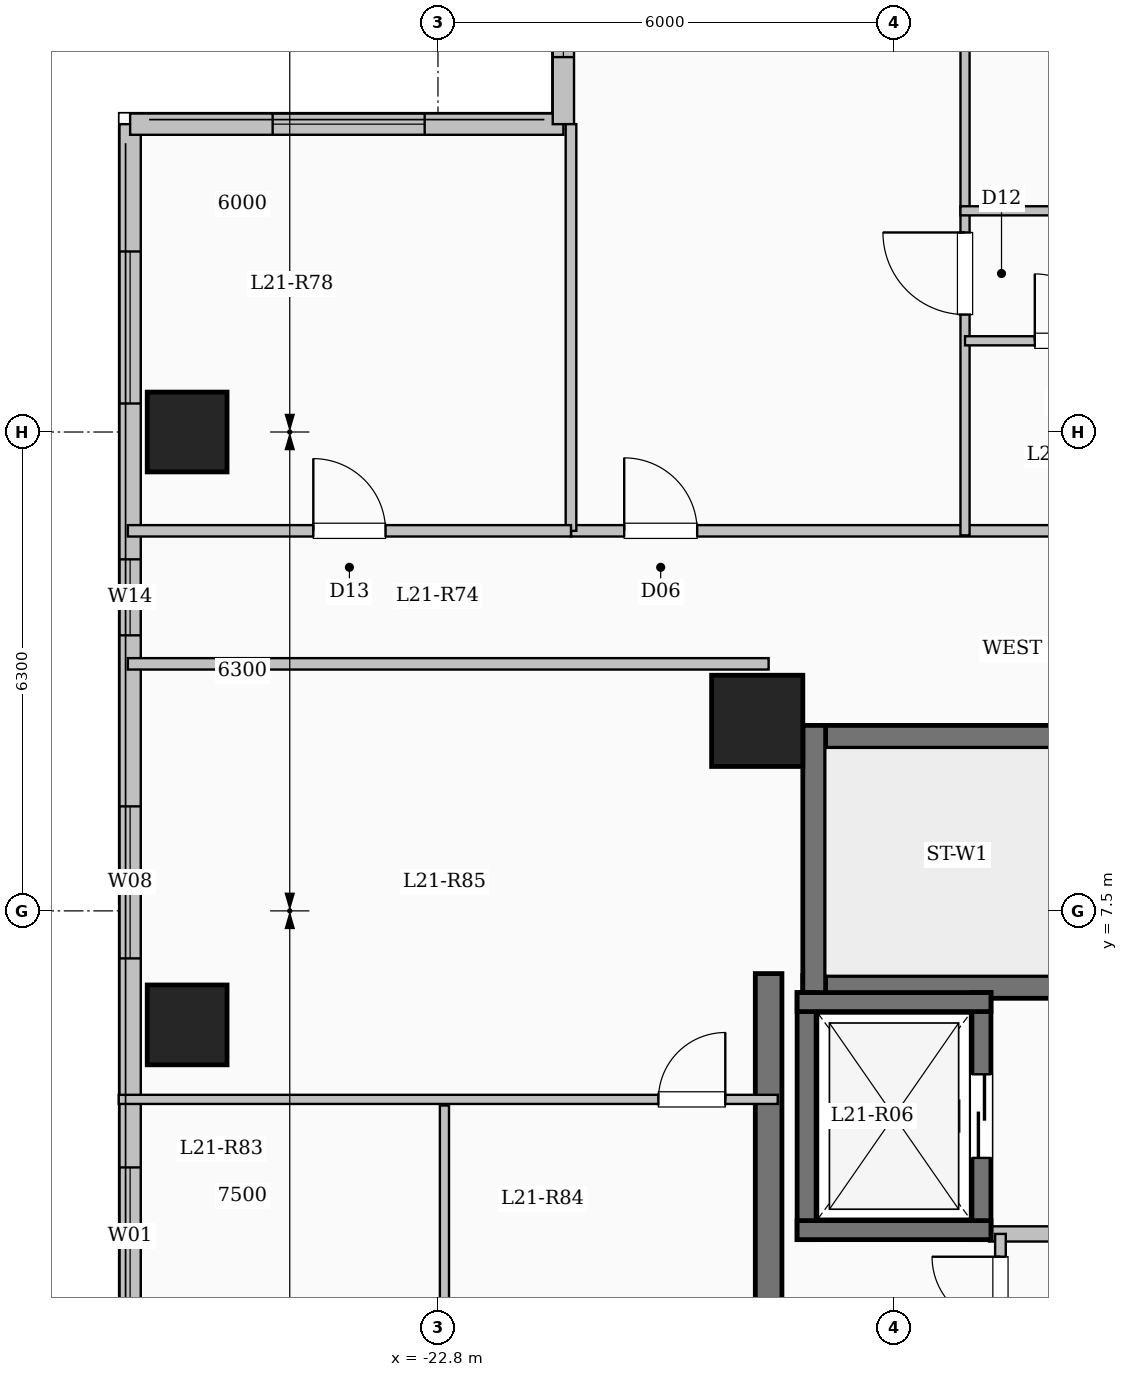
"""IFC4 building model, lengths in metres.
Left out: names, types, materials, properties, quantities, classifications, styles, units other than length and angle.
Written with IfcOpenShell. Run it as: python <this file> out.ifc"""

import sys

from ifc_helpers import new_model, si_unit, direction, frame, frame_2d, origin, origin_2d, place, context, subcontext, project, spatial, rectangle, extrude, element, fill, save


model = new_model("IFC4")
c1 = context("Model", 3, precision=1e-05, world=origin(), true_north=direction((0.0, 1.0)))
c2 = subcontext(c1, "Body", "Model", "MODEL_VIEW")
j1 = project(units=[si_unit("LENGTHUNIT", "METRE"), si_unit("PLANEANGLEUNIT", "RADIAN")], contexts=[c1])
p1 = place(None, origin())
s1 = spatial("IfcSite", under=j1, at=p1, CompositionType="ELEMENT")
p2 = place(p1, origin())
s2 = spatial("IfcBuilding", under=s1, at=p2, CompositionType="ELEMENT")
p3 = place(p2, frame((0.0, 0.0, 81.65)))
s3 = spatial("IfcBuildingStorey", under=s2, at=p3, CompositionType="ELEMENT", Elevation=81.65)
p4 = place(p3, frame((-18.6, 10.0, 0.0), z_axis=(0.0, 0.0, 1.0), x_axis=(1.0, 0.0, 0.0)))
e1 = element("IfcColumn", 1, at=p4, inside=s3, PredefinedType="COLUMN", context=c2, shape_type="SweptSolid", body=[
    extrude(rectangle(XDim=1.2, YDim=1.2, at=origin_2d()), origin(), (0.0, 0.0, 1.0), 3.35),
])
for number, where, z_axis, x_axis in (
    (2, (-26.1, 6.0, 0.0), (0.0, 0.0, 1.0), (1.0, 0.0, 0.0)),
    (3, (-26.1, 13.8, 0.0), (0.0, 0.0, 1.0), (1.0, 0.0, 0.0)),
):
    element("IfcColumn", number, at=place(p3, frame(where, z_axis=z_axis, x_axis=x_axis)), inside=s3, PredefinedType="COLUMN", context=c2, shape_type="SweptSolid", body=[
        extrude(rectangle(XDim=1.05, YDim=1.05, at=origin_2d()), origin(), (0.0, 0.0, 1.0), 3.35),
    ])
p5 = place(p3, frame((-26.85, -17.85, 0.0), z_axis=(0.0, 0.0, 1.0), x_axis=(0.0, 1.0, 0.0)))
e4 = element("IfcWall", 4, at=p5, inside=s3, PredefinedType="SOLIDWALL", context=c2, shape_type="SweptSolid", body=[
    extrude(rectangle(XDim=35.7, YDim=0.28, at=frame_2d((17.85, 0.0))), origin(), (0.0, 0.0, 1.0), 3.1),
])
p6 = place(p5, frame((2.55, 0.0, 0.9)))
e5 = element("IfcOpeningElement", 5, at=p6, cuts=e4, PredefinedType="OPENING", context=c2, shape_type="SweptSolid", body=[
    extrude(rectangle(XDim=2.4, YDim=1.8, at=frame_2d((1.2, 0.9))), frame((0.0, 0.15, 0.0), z_axis=(0.0, -1.0, 0.0), x_axis=(1.0, 0.0, 0.0)), (0.0, 0.0, 1.0), 0.3),
])
p7 = place(p5, frame((8.343, 0.0, 0.9)))
e6 = element("IfcOpeningElement", 6, at=p7, cuts=e4, PredefinedType="OPENING", context=c2, shape_type="SweptSolid", body=[
    extrude(rectangle(XDim=1.5, YDim=1.65, at=frame_2d((0.75, 0.825))), frame((0.0, 0.15, 0.0), z_axis=(0.0, -1.0, 0.0), x_axis=(1.0, 0.0, 0.0)), (0.0, 0.0, 1.0), 0.3),
])
p8 = place(p5, frame((13.75, 0.0, 0.9)))
e7 = element("IfcOpeningElement", 7, at=p8, cuts=e4, PredefinedType="OPENING", context=c2, shape_type="SweptSolid", body=[
    extrude(rectangle(XDim=2.4, YDim=1.8, at=frame_2d((1.2, 0.9))), frame((0.0, 0.15, 0.0), z_axis=(0.0, -1.0, 0.0), x_axis=(1.0, 0.0, 0.0)), (0.0, 0.0, 1.0), 0.3),
])
p9 = place(p5, frame((20.175, 0.0, 0.9)))
e8 = element("IfcOpeningElement", 8, at=p9, cuts=e4, PredefinedType="OPENING", context=c2, shape_type="SweptSolid", body=[
    extrude(rectangle(XDim=1.8, YDim=1.65, at=frame_2d((0.9, 0.825))), frame((0.0, 0.15, 0.0), z_axis=(0.0, -1.0, 0.0), x_axis=(1.0, 0.0, 0.0)), (0.0, 0.0, 1.0), 0.3),
])
p10 = place(p5, frame((24.725, 0.0, 0.9)))
e9 = element("IfcOpeningElement", 9, at=p10, cuts=e4, PredefinedType="OPENING", context=c2, shape_type="SweptSolid", body=[
    extrude(rectangle(XDim=2.0, YDim=1.7, at=frame_2d((1.0, 0.85))), frame((0.0, 0.15, 0.0), z_axis=(0.0, -1.0, 0.0), x_axis=(1.0, 0.0, 0.0)), (0.0, 0.0, 1.0), 0.3),
])
p11 = place(p5, frame((28.975, 0.0, 0.95)))
e10 = element("IfcOpeningElement", 10, at=p11, cuts=e4, PredefinedType="OPENING", context=c2, shape_type="SweptSolid", body=[
    extrude(rectangle(XDim=1.0, YDim=1.5, at=frame_2d((0.5, 0.75))), frame((0.0, 0.15, 0.0), z_axis=(0.0, -1.0, 0.0), x_axis=(1.0, 0.0, 0.0)), (0.0, 0.0, 1.0), 0.3),
])
p12 = place(p5, frame((32.025, 0.0, 0.9)))
e11 = element("IfcOpeningElement", 11, at=p12, cuts=e4, PredefinedType="OPENING", context=c2, shape_type="SweptSolid", body=[
    extrude(rectangle(XDim=2.0, YDim=1.7, at=frame_2d((1.0, 0.85))), frame((0.0, 0.15, 0.0), z_axis=(0.0, -1.0, 0.0), x_axis=(1.0, 0.0, 0.0)), (0.0, 0.0, 1.0), 0.3),
])
p13 = place(p3, frame((-26.85, 17.85, 0.0), z_axis=(0.0, 0.0, 1.0), x_axis=(1.0, 0.0, 0.0)))
e12 = element("IfcWall", 12, at=p13, inside=s3, PredefinedType="SOLIDWALL", context=c2, shape_type="SweptSolid", body=[
    extrude(rectangle(XDim=5.7, YDim=0.28, at=frame_2d((2.85, 0.0))), origin(), (0.0, 0.0, 1.0), 3.1),
])
p14 = place(p13, frame((1.875, 0.0, 0.9)))
e13 = element("IfcOpeningElement", 13, at=p14, cuts=e12, PredefinedType="OPENING", context=c2, shape_type="SweptSolid", body=[
    extrude(rectangle(XDim=2.0, YDim=1.7, at=frame_2d((1.0, 0.85))), frame((0.0, 0.15, 0.0), z_axis=(0.0, -1.0, 0.0), x_axis=(1.0, 0.0, 0.0)), (0.0, 0.0, 1.0), 0.3),
])
p15 = place(p3, frame((-21.15, 17.85, 0.0), z_axis=(0.0, 0.0, 1.0), x_axis=(0.0, 1.0, 0.0)))
e14 = element("IfcWall", 14, at=p15, inside=s3, PredefinedType="SOLIDWALL", context=c2, shape_type="SweptSolid", body=[
    extrude(rectangle(XDim=4.2, YDim=0.28, at=frame_2d((2.1, 0.0))), origin(), (0.0, 0.0, 1.0), 3.1),
])
p16 = place(p15, frame((0.882, 0.0, 0.9)))
e15 = element("IfcOpeningElement", 15, at=p16, cuts=e14, PredefinedType="OPENING", context=c2, shape_type="SweptSolid", body=[
    extrude(rectangle(XDim=2.4, YDim=1.8, at=frame_2d((1.2, 0.9))), frame((0.0, 0.15, 0.0), z_axis=(0.0, -1.0, 0.0), x_axis=(1.0, 0.0, 0.0)), (0.0, 0.0, 1.0), 0.3),
])
p17 = place(p3, frame((-18.0, 9.79, 0.0), z_axis=(0.0, 0.0, 1.0), x_axis=(1.0, 0.0, 0.0)))
e16 = element("IfcWall", 16, at=p17, inside=s3, PredefinedType="SHEAR", context=c2, shape_type="SweptSolid", body=[
    extrude(rectangle(XDim=8.0, YDim=0.3, at=frame_2d((4.0, 0.0))), origin(), (0.0, 0.0, 1.0), 3.35),
])
p18 = place(p3, frame((-18.0, 6.5, 0.0), z_axis=(0.0, 0.0, 1.0), x_axis=(1.0, 0.0, 0.0)))
e17 = element("IfcWall", 17, at=p18, inside=s3, PredefinedType="SHEAR", context=c2, shape_type="SweptSolid", body=[
    extrude(rectangle(XDim=8.0, YDim=0.3, at=frame_2d((4.0, 0.0))), origin(), (0.0, 0.0, 1.0), 3.35),
])
p19 = place(p18, frame((6.45, 0.0, 0.0)))
e18 = element("IfcOpeningElement", 18, at=p19, cuts=e17, PredefinedType="OPENING", context=c2, shape_type="SweptSolid", body=[
    extrude(rectangle(XDim=1.0, YDim=2.15, at=frame_2d((0.5, 1.075))), frame((0.0, 0.16, 0.0), z_axis=(0.0, -1.0, 0.0), x_axis=(1.0, 0.0, 0.0)), (0.0, 0.0, 1.0), 0.32),
])
p20 = place(p3, frame((-17.85, 6.35, 0.0), z_axis=(0.0, 0.0, 1.0), x_axis=(0.0, 1.0, 0.0)))
e19 = element("IfcWall", 19, at=p20, inside=s3, PredefinedType="SHEAR", context=c2, shape_type="SweptSolid", body=[
    extrude(rectangle(XDim=3.59, YDim=0.3, at=frame_2d((1.795, 0.0))), origin(), (0.0, 0.0, 1.0), 3.35),
])
p21 = place(p3, frame((-15.55, 3.25, 0.0), z_axis=(0.0, 0.0, 1.0), x_axis=(1.0, 0.0, 0.0)))
e20 = element("IfcWall", 20, at=p21, inside=s3, PredefinedType="SOLIDWALL", context=c2, shape_type="SweptSolid", body=[
    extrude(rectangle(XDim=5.4, YDim=0.2, at=frame_2d((2.7, 0.0))), origin(), (0.0, 0.0, 1.0), 3.1),
])
p22 = place(p3, frame((-17.95, 3.175, 0.0), z_axis=(0.0, 0.0, 1.0), x_axis=(0.0, 1.0, 0.0)))
e21 = element("IfcWall", 21, at=p22, inside=s3, PredefinedType="SHEAR", context=c2, shape_type="SweptSolid", body=[
    extrude(rectangle(XDim=3.25, YDim=0.25, at=frame_2d((1.625, 0.0))), origin(), (0.0, 0.0, 1.0), 3.35),
])
p23 = place(p3, frame((-15.65, 3.175, 0.0), z_axis=(0.0, 0.0, 1.0), x_axis=(0.0, 1.0, 0.0)))
e22 = element("IfcWall", 22, at=p23, inside=s3, PredefinedType="SHEAR", context=c2, shape_type="SweptSolid", body=[
    extrude(rectangle(XDim=3.25, YDim=0.25, at=frame_2d((1.625, 0.0))), origin(), (0.0, 0.0, 1.0), 3.35),
])
p24 = place(p23, frame((1.075, 0.0, 0.0)))
e23 = element("IfcOpeningElement", 23, at=p24, cuts=e22, PredefinedType="OPENING", context=c2, shape_type="SweptSolid", body=[
    extrude(rectangle(XDim=1.1, YDim=2.15, at=frame_2d((0.55, 1.075))), frame((0.0, 0.135, 0.0), z_axis=(0.0, -1.0, 0.0), x_axis=(1.0, 0.0, 0.0)), (0.0, 0.0, 1.0), 0.27),
])
for number, where, z_axis, x_axis in (
    (24, (-18.075, 3.3, 0.0), (0.0, 0.0, 1.0), (1.0, 0.0, 0.0)),
    (25, (-18.075, 6.3, 0.0), (0.0, 0.0, 1.0), (1.0, 0.0, 0.0)),
):
    element("IfcWall", number, at=place(p3, frame(where, z_axis=z_axis, x_axis=x_axis)), inside=s3, PredefinedType="SHEAR", context=c2, shape_type="SweptSolid", body=[
        extrude(rectangle(XDim=2.55, YDim=0.25, at=frame_2d((1.275, 0.0))), origin(), (0.0, 0.0, 1.0), 3.35),
    ])
p25 = place(p3, frame((-18.45, -7.375, 0.0), z_axis=(0.0, 0.0, 1.0), x_axis=(0.0, 1.0, 0.0)))
e26 = element("IfcWall", 26, at=p25, inside=s3, PredefinedType="SHEAR", context=c2, shape_type="SweptSolid", body=[
    extrude(rectangle(XDim=14.05, YDim=0.35, at=frame_2d((7.025, 0.0))), origin(), (0.0, 0.0, 1.0), 3.35),
])
p26 = place(p3, frame((-15.4, -7.2, 0.0), z_axis=(0.0, 0.0, 1.0), x_axis=(0.0, 1.0, 0.0)))
e27 = element("IfcWall", 27, at=p26, inside=s3, PredefinedType="PARTITIONING", context=c2, shape_type="SweptSolid", body=[
    extrude(rectangle(XDim=10.45, YDim=0.14, at=frame_2d((5.225, 0.0))), origin(), (0.0, 0.0, 1.0), 3.1),
])
p27 = place(p26, frame((9.25, 0.0, 0.0)))
e28 = element("IfcOpeningElement", 28, at=p27, cuts=e27, PredefinedType="OPENING", context=c2, shape_type="SweptSolid", body=[
    extrude(rectangle(XDim=0.9, YDim=2.08, at=frame_2d((0.45, 1.04))), frame((0.0, 0.08, 0.0), z_axis=(0.0, -1.0, 0.0), x_axis=(1.0, 0.0, 0.0)), (0.0, 0.0, 1.0), 0.16),
])
p28 = place(p3, frame((-21.05, 12.5, 0.0), z_axis=(0.0, 0.0, 1.0), x_axis=(1.0, 0.0, 0.0)))
e29 = element("IfcWall", 29, at=p28, inside=s3, PredefinedType="PARTITIONING", context=c2, shape_type="SweptSolid", body=[
    extrude(rectangle(XDim=17.2, YDim=0.15, at=frame_2d((8.6, 0.0))), origin(), (0.0, 0.0, 1.0), 3.1),
])
p29 = place(p28, frame((0.7, 0.0, 0.0)))
e30 = element("IfcOpeningElement", 30, at=p29, cuts=e29, PredefinedType="OPENING", context=c2, shape_type="SweptSolid", body=[
    extrude(rectangle(XDim=0.96, YDim=2.15, at=frame_2d((0.48, 1.075))), frame((0.0, 0.085, 0.0), z_axis=(0.0, -1.0, 0.0), x_axis=(1.0, 0.0, 0.0)), (0.0, 0.0, 1.0), 0.17),
])
p30 = place(p28, frame((11.068, 0.0, 0.0)))
e31 = element("IfcOpeningElement", 31, at=p30, cuts=e29, PredefinedType="OPENING", context=c2, shape_type="SweptSolid", body=[
    extrude(rectangle(XDim=0.96, YDim=2.15, at=frame_2d((0.48, 1.075))), frame((0.0, 0.085, 0.0), z_axis=(0.0, -1.0, 0.0), x_axis=(1.0, 0.0, 0.0)), (0.0, 0.0, 1.0), 0.17),
])
p31 = place(p3, frame((-15.866, 12.44, 0.0), z_axis=(0.0, 0.0, 1.0), x_axis=(0.0, 1.0, 0.0)))
e32 = element("IfcWall", 32, at=p31, inside=s3, PredefinedType="PARTITIONING", context=c2, shape_type="SweptSolid", body=[
    extrude(rectangle(XDim=9.66, YDim=0.12, at=frame_2d((4.83, 0.0))), origin(), (0.0, 0.0, 1.0), 3.1),
])
p32 = place(p31, frame((2.905, 0.0, 0.0)))
e33 = element("IfcOpeningElement", 33, at=p32, cuts=e32, PredefinedType="OPENING", context=c2, shape_type="SweptSolid", body=[
    extrude(rectangle(XDim=1.08, YDim=2.15, at=frame_2d((0.54, 1.075))), frame((0.0, 0.07, 0.0), z_axis=(0.0, -1.0, 0.0), x_axis=(1.0, 0.0, 0.0)), (0.0, 0.0, 1.0), 0.14),
])
p33 = place(p3, frame((-15.866, 15.0, 0.0), z_axis=(0.0, 0.0, 1.0), x_axis=(1.0, 0.0, 0.0)))
e34 = element("IfcWall", 34, at=p33, inside=s3, PredefinedType="PARTITIONING", context=c2, shape_type="SweptSolid", body=[
    extrude(rectangle(XDim=2.716, YDim=0.12, at=frame_2d((1.358, 0.0))), origin(), (0.0, 0.0, 1.0), 3.1),
])
p34 = place(p33, frame((0.918, 0.0, 0.0)))
e35 = element("IfcOpeningElement", 35, at=p34, cuts=e34, PredefinedType="OPENING", context=c2, shape_type="SweptSolid", body=[
    extrude(rectangle(XDim=0.88, YDim=2.1, at=frame_2d((0.44, 1.05))), frame((0.0, 0.07, 0.0), z_axis=(0.0, -1.0, 0.0), x_axis=(1.0, 0.0, 0.0)), (0.0, 0.0, 1.0), 0.14),
])
p35 = place(p3, frame((-15.926, 16.71, 0.0), z_axis=(0.0, 0.0, 1.0), x_axis=(1.0, 0.0, 0.0)))
e36 = element("IfcWall", 36, at=p35, inside=s3, PredefinedType="PARTITIONING", context=c2, shape_type="SweptSolid", body=[
    extrude(rectangle(XDim=5.304, YDim=0.12, at=frame_2d((2.652, 0.0))), origin(), (0.0, 0.0, 1.0), 3.1),
])
p36 = place(p35, frame((2.122, 0.0, 0.0)))
e37 = element("IfcOpeningElement", 37, at=p36, cuts=e36, PredefinedType="OPENING", context=c2, shape_type="SweptSolid", body=[
    extrude(rectangle(XDim=0.88, YDim=2.1, at=frame_2d((0.44, 1.05))), frame((0.0, 0.07, 0.0), z_axis=(0.0, -1.0, 0.0), x_axis=(1.0, 0.0, 0.0)), (0.0, 0.0, 1.0), 0.14),
])
p37 = place(p3, frame((-26.88, 10.75, 0.0), z_axis=(0.0, 0.0, 1.0), x_axis=(1.0, 0.0, 0.0)))
e38 = element("IfcWall", 38, at=p37, inside=s3, PredefinedType="PARTITIONING", context=c2, shape_type="SweptSolid", body=[
    extrude(rectangle(XDim=8.43, YDim=0.15, at=frame_2d((4.215, 0.0))), origin(), (0.0, 0.0, 1.0), 3.1),
])
p38 = place(p3, frame((-21.05, 12.5, 0.0), z_axis=(0.0, 0.0, 1.0), x_axis=(0.0, 1.0, 0.0)))
e39 = element("IfcWall", 39, at=p38, inside=s3, PredefinedType="PARTITIONING", context=c2, shape_type="SweptSolid", body=[
    extrude(rectangle(XDim=5.35, YDim=0.14, at=frame_2d((2.675, 0.0))), origin(), (0.0, 0.0, 1.0), 3.1),
])
p39 = place(p3, frame((-26.88, 12.5, 0.0), z_axis=(0.0, 0.0, 1.0), x_axis=(1.0, 0.0, 0.0)))
e40 = element("IfcWall", 40, at=p39, inside=s3, PredefinedType="PARTITIONING", context=c2, shape_type="SweptSolid", body=[
    extrude(rectangle(XDim=5.83, YDim=0.15, at=frame_2d((2.915, 0.0))), origin(), (0.0, 0.0, 1.0), 3.1),
])
p40 = place(p39, frame((2.44, 0.0, 0.0)))
e41 = element("IfcOpeningElement", 41, at=p40, cuts=e40, PredefinedType="OPENING", context=c2, shape_type="SweptSolid", body=[
    extrude(rectangle(XDim=0.95, YDim=2.15, at=frame_2d((0.475, 1.075))), frame((0.0, 0.085, 0.0), z_axis=(0.0, -1.0, 0.0), x_axis=(1.0, 0.0, 0.0)), (0.0, 0.0, 1.0), 0.17),
])
p41 = place(p3, frame((-27.0, 5.02, 0.0), z_axis=(0.0, 0.0, 1.0), x_axis=(1.0, 0.0, 0.0)))
e42 = element("IfcWall", 42, at=p41, inside=s3, PredefinedType="PARTITIONING", context=c2, shape_type="SweptSolid", body=[
    extrude(rectangle(XDim=8.67, YDim=0.12, at=frame_2d((4.335, 0.0))), origin(), (0.0, 0.0, 1.0), 3.1),
])
p42 = place(p41, frame((7.1, 0.0, 0.0)))
e43 = element("IfcOpeningElement", 43, at=p42, cuts=e42, PredefinedType="OPENING", context=c2, shape_type="SweptSolid", body=[
    extrude(rectangle(XDim=0.88, YDim=2.1, at=frame_2d((0.44, 1.05))), frame((0.0, 0.07, 0.0), z_axis=(0.0, -1.0, 0.0), x_axis=(1.0, 0.0, 0.0)), (0.0, 0.0, 1.0), 0.14),
])
p43 = place(p3, frame((-22.715, 1.36, 0.0), z_axis=(0.0, 0.0, 1.0), x_axis=(0.0, 1.0, 0.0)))
e44 = element("IfcWall", 44, at=p43, inside=s3, PredefinedType="PARTITIONING", context=c2, shape_type="SweptSolid", body=[
    extrude(rectangle(XDim=3.58, YDim=0.12, at=frame_2d((1.79, 0.0))), origin(), (0.0, 0.0, 1.0), 3.1),
])
p44 = place(p9, origin())
e45 = element("IfcWindow", 45, at=p44, inside=s3, PartitioningType="SINGLE_PANEL", PredefinedType="WINDOW", context=c2, shape_type="SweptSolid", body=[
    extrude(rectangle(XDim=1.8, YDim=1.65, at=frame_2d((0.9, 0.825))), frame((0.0, 0.03, 0.0), z_axis=(0.0, -1.0, 0.0), x_axis=(1.0, 0.0, 0.0)), (0.0, 0.0, 1.0), 0.06),
])
fill(e8, e45)
p45 = place(p10, origin())
e46 = element("IfcWindow", 46, at=p45, inside=s3, PartitioningType="SINGLE_PANEL", PredefinedType="WINDOW", context=c2, shape_type="SweptSolid", body=[
    extrude(rectangle(XDim=2.0, YDim=1.7, at=frame_2d((1.0, 0.85))), frame((0.0, 0.03, 0.0), z_axis=(0.0, -1.0, 0.0), x_axis=(1.0, 0.0, 0.0)), (0.0, 0.0, 1.0), 0.06),
])
fill(e9, e46)
p46 = place(p11, origin())
e47 = element("IfcWindow", 47, at=p46, inside=s3, PartitioningType="SINGLE_PANEL", PredefinedType="WINDOW", context=c2, shape_type="SweptSolid", body=[
    extrude(rectangle(XDim=1.0, YDim=1.5, at=frame_2d((0.5, 0.75))), frame((0.0, 0.03, 0.0), z_axis=(0.0, -1.0, 0.0), x_axis=(1.0, 0.0, 0.0)), (0.0, 0.0, 1.0), 0.06),
])
fill(e10, e47)
p47 = place(p12, origin())
e48 = element("IfcWindow", 48, at=p47, inside=s3, PartitioningType="SINGLE_PANEL", PredefinedType="WINDOW", context=c2, shape_type="SweptSolid", body=[
    extrude(rectangle(XDim=2.0, YDim=1.7, at=frame_2d((1.0, 0.85))), frame((0.0, 0.03, 0.0), z_axis=(0.0, -1.0, 0.0), x_axis=(1.0, 0.0, 0.0)), (0.0, 0.0, 1.0), 0.06),
])
fill(e11, e48)
p48 = place(p14, origin())
e49 = element("IfcWindow", 49, at=p48, inside=s3, PartitioningType="SINGLE_PANEL", PredefinedType="WINDOW", context=c2, shape_type="SweptSolid", body=[
    extrude(rectangle(XDim=2.0, YDim=1.7, at=frame_2d((1.0, 0.85))), frame((0.0, 0.03, 0.0), z_axis=(0.0, -1.0, 0.0), x_axis=(1.0, 0.0, 0.0)), (0.0, 0.0, 1.0), 0.06),
])
fill(e13, e49)
p49 = place(p16, origin())
e50 = element("IfcWindow", 50, at=p49, inside=s3, PartitioningType="SINGLE_PANEL", PredefinedType="WINDOW", context=c2, shape_type="SweptSolid", body=[
    extrude(rectangle(XDim=2.4, YDim=1.8, at=frame_2d((1.2, 0.9))), frame((0.0, 0.03, 0.0), z_axis=(0.0, -1.0, 0.0), x_axis=(1.0, 0.0, 0.0)), (0.0, 0.0, 1.0), 0.06),
])
fill(e15, e50)
p50 = place(p24, origin())
e51 = element("IfcDoor", 51, at=p50, inside=s3, OperationType="SLIDING_TO_LEFT", PredefinedType="DOOR", context=c2, shape_type="SweptSolid", body=[
    extrude(rectangle(XDim=1.1, YDim=2.15, at=frame_2d((0.55, 1.075))), frame((0.0, 0.025, 0.0), z_axis=(0.0, -1.0, 0.0), x_axis=(1.0, 0.0, 0.0)), (0.0, 0.0, 1.0), 0.05),
])
fill(e23, e51)
p51 = place(p27, origin())
e52 = element("IfcDoor", 52, at=p51, inside=s3, OperationType="SINGLE_SWING_RIGHT", PredefinedType="DOOR", context=c2, shape_type="SweptSolid", body=[
    extrude(rectangle(XDim=0.9, YDim=2.08, at=frame_2d((0.45, 1.04))), frame((0.0, 0.025, 0.0), z_axis=(0.0, -1.0, 0.0), x_axis=(1.0, 0.0, 0.0)), (0.0, 0.0, 1.0), 0.05),
])
fill(e28, e52)
p52 = place(p29, origin())
e53 = element("IfcDoor", 53, at=p52, inside=s3, OperationType="SINGLE_SWING_LEFT", PredefinedType="DOOR", context=c2, shape_type="SweptSolid", body=[
    extrude(rectangle(XDim=0.96, YDim=2.15, at=frame_2d((0.48, 1.075))), frame((0.0, 0.025, 0.0), z_axis=(0.0, -1.0, 0.0), x_axis=(1.0, 0.0, 0.0)), (0.0, 0.0, 1.0), 0.05),
])
fill(e30, e53)
p53 = place(p32, origin())
e54 = element("IfcDoor", 54, at=p53, inside=s3, OperationType="SINGLE_SWING_RIGHT", PredefinedType="DOOR", context=c2, shape_type="SweptSolid", body=[
    extrude(rectangle(XDim=1.08, YDim=2.15, at=frame_2d((0.54, 1.075))), frame((0.0, 0.025, 0.0), z_axis=(0.0, -1.0, 0.0), x_axis=(1.0, 0.0, 0.0)), (0.0, 0.0, 1.0), 0.05),
])
fill(e33, e54)
p54 = place(p34, origin())
e55 = element("IfcDoor", 55, at=p54, inside=s3, OperationType="SINGLE_SWING_LEFT", PredefinedType="DOOR", context=c2, shape_type="SweptSolid", body=[
    extrude(rectangle(XDim=0.88, YDim=2.1, at=frame_2d((0.44, 1.05))), frame((0.0, 0.025, 0.0), z_axis=(0.0, -1.0, 0.0), x_axis=(1.0, 0.0, 0.0)), (0.0, 0.0, 1.0), 0.05),
])
fill(e35, e55)
p55 = place(p40, origin())
e56 = element("IfcDoor", 56, at=p55, inside=s3, OperationType="SINGLE_SWING_LEFT", PredefinedType="DOOR", context=c2, shape_type="SweptSolid", body=[
    extrude(rectangle(XDim=0.95, YDim=2.15, at=frame_2d((0.475, 1.075))), frame((0.0, 0.025, 0.0), z_axis=(0.0, -1.0, 0.0), x_axis=(1.0, 0.0, 0.0)), (0.0, 0.0, 1.0), 0.05),
])
fill(e41, e56)
p56 = place(p42, origin())
e57 = element("IfcDoor", 57, at=p56, inside=s3, OperationType="SINGLE_SWING_RIGHT", PredefinedType="DOOR", context=c2, shape_type="SweptSolid", body=[
    extrude(rectangle(XDim=0.88, YDim=2.1, at=frame_2d((0.44, 1.05))), frame((0.0, 0.025, 0.0), z_axis=(0.0, -1.0, 0.0), x_axis=(1.0, 0.0, 0.0)), (0.0, 0.0, 1.0), 0.05),
])
fill(e43, e57)
save(model, sys.argv[1])
